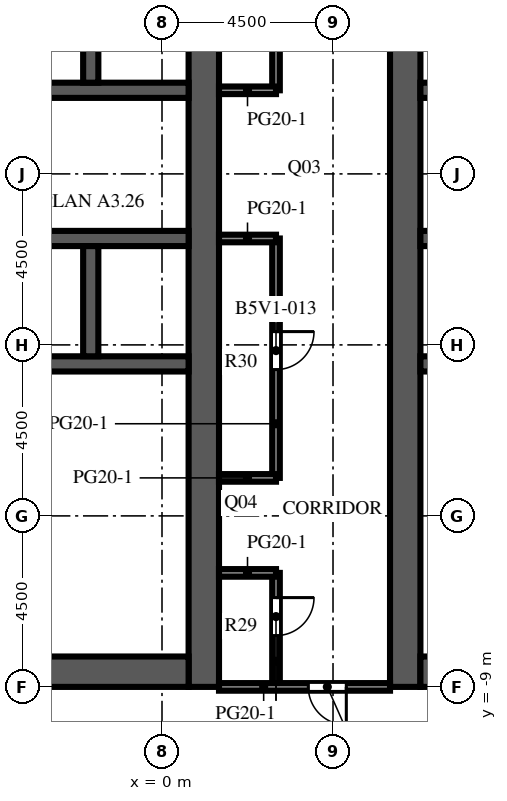
"""IFC4 building model, lengths in metres.
Left out: names, types, materials, properties, quantities, classifications, styles, units other than length and angle.
Written with IfcOpenShell. Run it as: python <this file> out.ifc"""

import sys

from ifc_helpers import new_model, si_unit, direction, frame, frame_2d, origin, place, context, subcontext, project, spatial, rectangle, extrude, element, fill, save


model = new_model("IFC4")
c1 = context("Model", 3, precision=1e-05, world=origin(), true_north=direction((0.0, 1.0)))
c2 = subcontext(c1, "Body", "Model", "MODEL_VIEW")
j1 = project(units=[si_unit("LENGTHUNIT", "METRE"), si_unit("PLANEANGLEUNIT", "RADIAN")], contexts=[c1])
p1 = place(None, origin())
s1 = spatial("IfcSite", under=j1, at=p1, CompositionType="ELEMENT")
p2 = place(p1, origin())
s2 = spatial("IfcBuilding", under=s1, at=p2, CompositionType="ELEMENT")
p3 = place(p2, frame((0.0, 0.0, 169.1)))
s3 = spatial("IfcBuildingStorey", under=s2, at=p3, CompositionType="ELEMENT", Elevation=169.1)
p4 = place(p3, frame((1.1, -9.0, 0.0), z_axis=(0.0, 0.0, 1.0), x_axis=(0.0, 1.0, 0.0)))
e1 = element("IfcWall", 1, at=p4, inside=s3, PredefinedType="SHEAR", context=c2, shape_type="SweptSolid", body=[
    extrude(rectangle(XDim=27.5, YDim=0.8, at=frame_2d((13.75, 0.0))), origin(), (0.0, 0.0, 1.0), 4.1),
])
p5 = place(p4, frame((12.55, 0.0, 0.0)))
e2 = element("IfcOpeningElement", 2, at=p5, cuts=e1, PredefinedType="OPENING", context=c2, shape_type="SweptSolid", body=[
    extrude(rectangle(XDim=2.4, YDim=2.4, at=frame_2d((1.2, 1.2))), frame((0.0, 0.41, 0.0), z_axis=(0.0, -1.0, 0.0), x_axis=(1.0, 0.0, 0.0)), (0.0, 0.0, 1.0), 0.82),
])
p6 = place(p4, frame((3.95, 0.0, 0.0)))
e3 = element("IfcOpeningElement", 3, at=p6, cuts=e1, PredefinedType="OPENING", context=c2, shape_type="SweptSolid", body=[
    extrude(rectangle(XDim=1.2, YDim=2.1, at=frame_2d((0.6, 1.05))), frame((0.0, 0.41, 0.0), z_axis=(0.0, -1.0, 0.0), x_axis=(1.0, 0.0, 0.0)), (0.0, 0.0, 1.0), 0.82),
])
p7 = place(p4, frame((22.35, 0.0, 0.0)))
e4 = element("IfcOpeningElement", 4, at=p7, cuts=e1, PredefinedType="OPENING", context=c2, shape_type="SweptSolid", body=[
    extrude(rectangle(XDim=1.2, YDim=2.1, at=frame_2d((0.6, 1.05))), frame((0.0, 0.41, 0.0), z_axis=(0.0, -1.0, 0.0), x_axis=(1.0, 0.0, 0.0)), (0.0, 0.0, 1.0), 0.82),
])
p8 = place(p3, frame((-9.7, -8.6, 0.0), z_axis=(0.0, 0.0, 1.0), x_axis=(1.0, 0.0, 0.0)))
e5 = element("IfcWall", 5, at=p8, inside=s3, PredefinedType="SHEAR", context=c2, shape_type="SweptSolid", body=[
    extrude(rectangle(XDim=10.4, YDim=0.8, at=frame_2d((5.2, 0.0))), origin(), (0.0, 0.0, 1.0), 4.1),
])
p9 = place(p3, frame((-9.7, -0.5, 0.0), z_axis=(0.0, 0.0, 1.0), x_axis=(1.0, 0.0, 0.0)))
e6 = element("IfcWall", 6, at=p9, inside=s3, PredefinedType="SHEAR", context=c2, shape_type="SweptSolid", body=[
    extrude(rectangle(XDim=10.4, YDim=0.4, at=frame_2d((5.2, 0.0))), origin(), (0.0, 0.0, 1.0), 4.1),
])
p10 = place(p3, frame((-9.7, 2.8, 0.0), z_axis=(0.0, 0.0, 1.0), x_axis=(1.0, 0.0, 0.0)))
e7 = element("IfcWall", 7, at=p10, inside=s3, PredefinedType="SHEAR", context=c2, shape_type="SweptSolid", body=[
    extrude(rectangle(XDim=10.4, YDim=0.4, at=frame_2d((5.2, 0.0))), origin(), (0.0, 0.0, 1.0), 4.1),
])
p11 = place(p10, frame((0.738, 0.0, 0.0)))
e8 = element("IfcOpeningElement", 8, at=p11, cuts=e7, PredefinedType="OPENING", context=c2, shape_type="SweptSolid", body=[
    extrude(rectangle(XDim=1.1, YDim=2.1, at=frame_2d((0.55, 1.05))), frame((0.0, 0.21, 0.0), z_axis=(0.0, -1.0, 0.0), x_axis=(1.0, 0.0, 0.0)), (0.0, 0.0, 1.0), 0.42),
])
p12 = place(p10, frame((3.337, 0.0, 0.0)))
e9 = element("IfcOpeningElement", 9, at=p12, cuts=e7, PredefinedType="OPENING", context=c2, shape_type="SweptSolid", body=[
    extrude(rectangle(XDim=1.1, YDim=2.1, at=frame_2d((0.55, 1.05))), frame((0.0, 0.21, 0.0), z_axis=(0.0, -1.0, 0.0), x_axis=(1.0, 0.0, 0.0)), (0.0, 0.0, 1.0), 0.42),
])
p13 = place(p10, frame((6.012, 0.0, 0.0)))
e10 = element("IfcOpeningElement", 10, at=p13, cuts=e7, PredefinedType="OPENING", context=c2, shape_type="SweptSolid", body=[
    extrude(rectangle(XDim=1.0, YDim=2.1, at=frame_2d((0.5, 1.05))), frame((0.0, 0.21, 0.0), z_axis=(0.0, -1.0, 0.0), x_axis=(1.0, 0.0, 0.0)), (0.0, 0.0, 1.0), 0.42),
])
p14 = place(p10, frame((8.613, 0.0, 0.0)))
e11 = element("IfcOpeningElement", 11, at=p14, cuts=e7, PredefinedType="OPENING", context=c2, shape_type="SweptSolid", body=[
    extrude(rectangle(XDim=1.0, YDim=2.1, at=frame_2d((0.5, 1.05))), frame((0.0, 0.21, 0.0), z_axis=(0.0, -1.0, 0.0), x_axis=(1.0, 0.0, 0.0)), (0.0, 0.0, 1.0), 0.42),
])
p15 = place(p3, frame((-9.7, 6.7, 0.0), z_axis=(0.0, 0.0, 1.0), x_axis=(1.0, 0.0, 0.0)))
e12 = element("IfcWall", 12, at=p15, inside=s3, PredefinedType="SHEAR", context=c2, shape_type="SweptSolid", body=[
    extrude(rectangle(XDim=10.4, YDim=0.4, at=frame_2d((5.2, 0.0))), origin(), (0.0, 0.0, 1.0), 4.1),
])
p16 = place(p15, frame((3.337, 0.0, 0.0)))
e13 = element("IfcOpeningElement", 13, at=p16, cuts=e12, PredefinedType="OPENING", context=c2, shape_type="SweptSolid", body=[
    extrude(rectangle(XDim=1.1, YDim=2.1, at=frame_2d((0.55, 1.05))), frame((0.0, 0.21, 0.0), z_axis=(0.0, -1.0, 0.0), x_axis=(1.0, 0.0, 0.0)), (0.0, 0.0, 1.0), 0.42),
])
p17 = place(p15, frame((5.962, 0.0, 0.0)))
e14 = element("IfcOpeningElement", 14, at=p17, cuts=e12, PredefinedType="OPENING", context=c2, shape_type="SweptSolid", body=[
    extrude(rectangle(XDim=1.1, YDim=2.1, at=frame_2d((0.55, 1.05))), frame((0.0, 0.21, 0.0), z_axis=(0.0, -1.0, 0.0), x_axis=(1.0, 0.0, 0.0)), (0.0, 0.0, 1.0), 0.42),
])
p18 = place(p15, frame((8.663, 0.0, 0.0)))
e15 = element("IfcOpeningElement", 15, at=p18, cuts=e12, PredefinedType="OPENING", context=c2, shape_type="SweptSolid", body=[
    extrude(rectangle(XDim=1.1, YDim=2.1, at=frame_2d((0.55, 1.05))), frame((0.0, 0.21, 0.0), z_axis=(0.0, -1.0, 0.0), x_axis=(1.0, 0.0, 0.0)), (0.0, 0.0, 1.0), 0.42),
])
p19 = place(p15, frame((0.688, 0.0, 0.0)))
e16 = element("IfcOpeningElement", 16, at=p19, cuts=e12, PredefinedType="OPENING", context=c2, shape_type="SweptSolid", body=[
    extrude(rectangle(XDim=1.0, YDim=2.1, at=frame_2d((0.5, 1.05))), frame((0.0, 0.21, 0.0), z_axis=(0.0, -1.0, 0.0), x_axis=(1.0, 0.0, 0.0)), (0.0, 0.0, 1.0), 0.42),
])
for number, where, z_axis, x_axis in (
    (17, (-1.875, -0.3, 0.0), (0.0, 0.0, 1.0), (0.0, 1.0, 0.0)),
    (18, (-1.875, 6.9, 0.0), (0.0, 0.0, 1.0), (0.0, 1.0, 0.0)),
):
    element("IfcWall", number, at=place(p3, frame(where, z_axis=z_axis, x_axis=x_axis)), inside=s3, PredefinedType="SHEAR", context=c2, shape_type="SweptSolid", body=[
        extrude(rectangle(XDim=2.9, YDim=0.4, at=frame_2d((1.45, 0.0))), origin(), (0.0, 0.0, 1.0), 4.1),
    ])
p20 = place(p3, frame((6.4, -9.0, 0.0), z_axis=(0.0, 0.0, 1.0), x_axis=(0.0, 1.0, 0.0)))
e19 = element("IfcWall", 19, at=p20, inside=s3, PredefinedType="SHEAR", context=c2, shape_type="SweptSolid", body=[
    extrude(rectangle(XDim=27.5, YDim=0.8, at=frame_2d((13.75, 0.0))), origin(), (0.0, 0.0, 1.0), 4.1),
])
p21 = place(p20, frame((12.55, 0.0, 0.0)))
e20 = element("IfcOpeningElement", 20, at=p21, cuts=e19, PredefinedType="OPENING", context=c2, shape_type="SweptSolid", body=[
    extrude(rectangle(XDim=2.4, YDim=2.4, at=frame_2d((1.2, 1.2))), frame((0.0, 0.41, 0.0), z_axis=(0.0, -1.0, 0.0), x_axis=(1.0, 0.0, 0.0)), (0.0, 0.0, 1.0), 0.82),
])
p22 = place(p20, frame((3.95, 0.0, 0.0)))
e21 = element("IfcOpeningElement", 21, at=p22, cuts=e19, PredefinedType="OPENING", context=c2, shape_type="SweptSolid", body=[
    extrude(rectangle(XDim=1.2, YDim=2.1, at=frame_2d((0.6, 1.05))), frame((0.0, 0.41, 0.0), z_axis=(0.0, -1.0, 0.0), x_axis=(1.0, 0.0, 0.0)), (0.0, 0.0, 1.0), 0.82),
])
p23 = place(p20, frame((22.35, 0.0, 0.0)))
e22 = element("IfcOpeningElement", 22, at=p23, cuts=e19, PredefinedType="OPENING", context=c2, shape_type="SweptSolid", body=[
    extrude(rectangle(XDim=1.2, YDim=2.1, at=frame_2d((0.6, 1.05))), frame((0.0, 0.41, 0.0), z_axis=(0.0, -1.0, 0.0), x_axis=(1.0, 0.0, 0.0)), (0.0, 0.0, 1.0), 0.82),
])
p24 = place(p3, frame((6.8, -8.6, 0.0), z_axis=(0.0, 0.0, 1.0), x_axis=(1.0, 0.0, 0.0)))
e23 = element("IfcWall", 23, at=p24, inside=s3, PredefinedType="SHEAR", context=c2, shape_type="SweptSolid", body=[
    extrude(rectangle(XDim=10.4, YDim=0.8, at=frame_2d((5.2, 0.0))), origin(), (0.0, 0.0, 1.0), 4.1),
])
p25 = place(p3, frame((6.8, -0.5, 0.0), z_axis=(0.0, 0.0, 1.0), x_axis=(1.0, 0.0, 0.0)))
e24 = element("IfcWall", 24, at=p25, inside=s3, PredefinedType="SHEAR", context=c2, shape_type="SweptSolid", body=[
    extrude(rectangle(XDim=10.4, YDim=0.4, at=frame_2d((5.2, 0.0))), origin(), (0.0, 0.0, 1.0), 4.1),
])
p26 = place(p3, frame((6.8, 2.8, 0.0), z_axis=(0.0, 0.0, 1.0), x_axis=(1.0, 0.0, 0.0)))
e25 = element("IfcWall", 25, at=p26, inside=s3, PredefinedType="SHEAR", context=c2, shape_type="SweptSolid", body=[
    extrude(rectangle(XDim=10.4, YDim=0.4, at=frame_2d((5.2, 0.0))), origin(), (0.0, 0.0, 1.0), 4.1),
])
p27 = place(p26, frame((0.738, 0.0, 0.0)))
e26 = element("IfcOpeningElement", 26, at=p27, cuts=e25, PredefinedType="OPENING", context=c2, shape_type="SweptSolid", body=[
    extrude(rectangle(XDim=1.1, YDim=2.1, at=frame_2d((0.55, 1.05))), frame((0.0, 0.21, 0.0), z_axis=(0.0, -1.0, 0.0), x_axis=(1.0, 0.0, 0.0)), (0.0, 0.0, 1.0), 0.42),
])
p28 = place(p26, frame((3.337, 0.0, 0.0)))
e27 = element("IfcOpeningElement", 27, at=p28, cuts=e25, PredefinedType="OPENING", context=c2, shape_type="SweptSolid", body=[
    extrude(rectangle(XDim=1.1, YDim=2.1, at=frame_2d((0.55, 1.05))), frame((0.0, 0.21, 0.0), z_axis=(0.0, -1.0, 0.0), x_axis=(1.0, 0.0, 0.0)), (0.0, 0.0, 1.0), 0.42),
])
p29 = place(p26, frame((6.012, 0.0, 0.0)))
e28 = element("IfcOpeningElement", 28, at=p29, cuts=e25, PredefinedType="OPENING", context=c2, shape_type="SweptSolid", body=[
    extrude(rectangle(XDim=1.0, YDim=2.1, at=frame_2d((0.5, 1.05))), frame((0.0, 0.21, 0.0), z_axis=(0.0, -1.0, 0.0), x_axis=(1.0, 0.0, 0.0)), (0.0, 0.0, 1.0), 0.42),
])
p30 = place(p26, frame((8.613, 0.0, 0.0)))
e29 = element("IfcOpeningElement", 29, at=p30, cuts=e25, PredefinedType="OPENING", context=c2, shape_type="SweptSolid", body=[
    extrude(rectangle(XDim=1.0, YDim=2.1, at=frame_2d((0.5, 1.05))), frame((0.0, 0.21, 0.0), z_axis=(0.0, -1.0, 0.0), x_axis=(1.0, 0.0, 0.0)), (0.0, 0.0, 1.0), 0.42),
])
p31 = place(p3, frame((6.8, 6.7, 0.0), z_axis=(0.0, 0.0, 1.0), x_axis=(1.0, 0.0, 0.0)))
e30 = element("IfcWall", 30, at=p31, inside=s3, PredefinedType="SHEAR", context=c2, shape_type="SweptSolid", body=[
    extrude(rectangle(XDim=10.4, YDim=0.4, at=frame_2d((5.2, 0.0))), origin(), (0.0, 0.0, 1.0), 4.1),
])
p32 = place(p31, frame((3.337, 0.0, 0.0)))
e31 = element("IfcOpeningElement", 31, at=p32, cuts=e30, PredefinedType="OPENING", context=c2, shape_type="SweptSolid", body=[
    extrude(rectangle(XDim=1.1, YDim=2.1, at=frame_2d((0.55, 1.05))), frame((0.0, 0.21, 0.0), z_axis=(0.0, -1.0, 0.0), x_axis=(1.0, 0.0, 0.0)), (0.0, 0.0, 1.0), 0.42),
])
p33 = place(p31, frame((5.962, 0.0, 0.0)))
e32 = element("IfcOpeningElement", 32, at=p33, cuts=e30, PredefinedType="OPENING", context=c2, shape_type="SweptSolid", body=[
    extrude(rectangle(XDim=1.1, YDim=2.1, at=frame_2d((0.55, 1.05))), frame((0.0, 0.21, 0.0), z_axis=(0.0, -1.0, 0.0), x_axis=(1.0, 0.0, 0.0)), (0.0, 0.0, 1.0), 0.42),
])
p34 = place(p31, frame((8.663, 0.0, 0.0)))
e33 = element("IfcOpeningElement", 33, at=p34, cuts=e30, PredefinedType="OPENING", context=c2, shape_type="SweptSolid", body=[
    extrude(rectangle(XDim=1.1, YDim=2.1, at=frame_2d((0.55, 1.05))), frame((0.0, 0.21, 0.0), z_axis=(0.0, -1.0, 0.0), x_axis=(1.0, 0.0, 0.0)), (0.0, 0.0, 1.0), 0.42),
])
p35 = place(p31, frame((0.688, 0.0, 0.0)))
e34 = element("IfcOpeningElement", 34, at=p35, cuts=e30, PredefinedType="OPENING", context=c2, shape_type="SweptSolid", body=[
    extrude(rectangle(XDim=1.0, YDim=2.1, at=frame_2d((0.5, 1.05))), frame((0.0, 0.21, 0.0), z_axis=(0.0, -1.0, 0.0), x_axis=(1.0, 0.0, 0.0)), (0.0, 0.0, 1.0), 0.42),
])
p36 = place(p3, frame((-0.8, -8.2, 0.0), z_axis=(0.0, 0.0, 1.0), x_axis=(0.0, 1.0, 0.0)))
e35 = element("IfcWall", 35, at=p36, inside=s3, PredefinedType="PARTITIONING", context=c2, shape_type="SweptSolid", body=[
    extrude(rectangle(XDim=2.55, YDim=0.1, at=frame_2d((1.275, 0.0))), origin(), (0.0, 0.0, 1.0), 3.65),
])
p37 = place(p36, frame((0.775, 0.0, 0.0)))
e36 = element("IfcOpeningElement", 36, at=p37, cuts=e35, PredefinedType="OPENING", context=c2, shape_type="SweptSolid", body=[
    extrude(rectangle(XDim=1.0, YDim=2.1, at=frame_2d((0.5, 1.05))), frame((0.0, 0.06, 0.0), z_axis=(0.0, -1.0, 0.0), x_axis=(1.0, 0.0, 0.0)), (0.0, 0.0, 1.0), 0.12),
])
p38 = place(p3, frame((-0.8, -5.65, 0.0), z_axis=(0.0, 0.0, 1.0), x_axis=(0.0, 1.0, 0.0)))
e37 = element("IfcWall", 37, at=p38, inside=s3, PredefinedType="PARTITIONING", context=c2, shape_type="SweptSolid", body=[
    extrude(rectangle(XDim=2.1, YDim=0.1, at=frame_2d((1.05, 0.0))), origin(), (0.0, 0.0, 1.0), 3.65),
])
p39 = place(p38, frame((0.55, 0.0, 0.0)))
e38 = element("IfcOpeningElement", 38, at=p39, cuts=e37, PredefinedType="OPENING", context=c2, shape_type="SweptSolid", body=[
    extrude(rectangle(XDim=1.0, YDim=2.1, at=frame_2d((0.5, 1.05))), frame((0.0, 0.06, 0.0), z_axis=(0.0, -1.0, 0.0), x_axis=(1.0, 0.0, 0.0)), (0.0, 0.0, 1.0), 0.12),
])
p40 = place(p3, frame((-0.8, -3.55, 0.0), z_axis=(0.0, 0.0, 1.0), x_axis=(0.0, 1.0, 0.0)))
e39 = element("IfcWall", 39, at=p40, inside=s3, PredefinedType="PARTITIONING", context=c2, shape_type="SweptSolid", body=[
    extrude(rectangle(XDim=2.85, YDim=0.1, at=frame_2d((1.425, 0.0))), origin(), (0.0, 0.0, 1.0), 3.65),
])
p41 = place(p40, frame((0.925, 0.0, 0.0)))
e40 = element("IfcOpeningElement", 40, at=p41, cuts=e39, PredefinedType="OPENING", context=c2, shape_type="SweptSolid", body=[
    extrude(rectangle(XDim=1.0, YDim=2.1, at=frame_2d((0.5, 1.05))), frame((0.0, 0.06, 0.0), z_axis=(0.0, -1.0, 0.0), x_axis=(1.0, 0.0, 0.0)), (0.0, 0.0, 1.0), 0.12),
])
for number, where, z_axis, x_axis in (
    (41, (-4.3, -5.65, 0.0), (0.0, 0.0, 1.0), (1.0, 0.0, 0.0)),
    (42, (-4.3, -3.55, 0.0), (0.0, 0.0, 1.0), (1.0, 0.0, 0.0)),
):
    element("IfcWall", number, at=place(p3, frame(where, z_axis=z_axis, x_axis=x_axis)), inside=s3, PredefinedType="PARTITIONING", context=c2, shape_type="SweptSolid", body=[
        extrude(rectangle(XDim=3.5, YDim=0.1, at=frame_2d((1.75, 0.0))), origin(), (0.0, 0.0, 1.0), 3.65),
    ])
p42 = place(p3, frame((3.0, -9.0, 0.0), z_axis=(0.0, 0.0, 1.0), x_axis=(0.0, 1.0, 0.0)))
e43 = element("IfcWall", 43, at=p42, inside=s3, PredefinedType="PARTITIONING", context=c2, shape_type="SweptSolid", body=[
    extrude(rectangle(XDim=3.0, YDim=0.2, at=frame_2d((1.5, 0.0))), origin(), (0.0, 0.0, 1.0), 3.65),
])
p43 = place(p42, frame((1.35, 0.0, 0.0)))
e44 = element("IfcOpeningElement", 44, at=p43, cuts=e43, PredefinedType="OPENING", context=c2, shape_type="SweptSolid", body=[
    extrude(rectangle(XDim=1.0, YDim=2.1, at=frame_2d((0.5, 1.05))), frame((0.0, 0.11, 0.0), z_axis=(0.0, -1.0, 0.0), x_axis=(1.0, 0.0, 0.0)), (0.0, 0.0, 1.0), 0.22),
])
p44 = place(p3, frame((3.0, -3.5, 0.0), z_axis=(0.0, 0.0, 1.0), x_axis=(0.0, 1.0, 0.0)))
e45 = element("IfcWall", 45, at=p44, inside=s3, PredefinedType="PARTITIONING", context=c2, shape_type="SweptSolid", body=[
    extrude(rectangle(XDim=6.3, YDim=0.2, at=frame_2d((3.15, 0.0))), origin(), (0.0, 0.0, 1.0), 3.65),
])
p45 = place(p44, frame((2.85, 0.0, 0.0)))
e46 = element("IfcOpeningElement", 46, at=p45, cuts=e45, PredefinedType="OPENING", context=c2, shape_type="SweptSolid", body=[
    extrude(rectangle(XDim=1.0, YDim=2.1, at=frame_2d((0.5, 1.05))), frame((0.0, 0.11, 0.0), z_axis=(0.0, -1.0, 0.0), x_axis=(1.0, 0.0, 0.0)), (0.0, 0.0, 1.0), 0.22),
])
p46 = place(p3, frame((3.0, 6.7, 0.0), z_axis=(0.0, 0.0, 1.0), x_axis=(0.0, 1.0, 0.0)))
e47 = element("IfcWall", 47, at=p46, inside=s3, PredefinedType="PARTITIONING", context=c2, shape_type="SweptSolid", body=[
    extrude(rectangle(XDim=11.8, YDim=0.2, at=frame_2d((5.9, 0.0))), origin(), (0.0, 0.0, 1.0), 3.65),
])
p47 = place(p46, frame((5.35, 0.0, 0.0)))
e48 = element("IfcOpeningElement", 48, at=p47, cuts=e47, PredefinedType="OPENING", context=c2, shape_type="SweptSolid", body=[
    extrude(rectangle(XDim=1.0, YDim=2.1, at=frame_2d((0.5, 1.05))), frame((0.0, 0.11, 0.0), z_axis=(0.0, -1.0, 0.0), x_axis=(1.0, 0.0, 0.0)), (0.0, 0.0, 1.0), 0.22),
])
p48 = place(p3, frame((6.0, -9.0, 0.0), z_axis=(0.0, 0.0, 1.0), x_axis=(-1.0, 0.0, 0.0)))
e49 = element("IfcWall", 49, at=p48, inside=s3, PredefinedType="PARTITIONING", context=c2, shape_type="SweptSolid", body=[
    extrude(rectangle(XDim=4.5, YDim=0.2, at=frame_2d((2.25, 0.0))), origin(), (0.0, 0.0, 1.0), 3.65),
])
p49 = place(p48, frame((1.15, 0.0, 0.0)))
e50 = element("IfcOpeningElement", 50, at=p49, cuts=e49, PredefinedType="OPENING", context=c2, shape_type="SweptSolid", body=[
    extrude(rectangle(XDim=1.0, YDim=2.1, at=frame_2d((0.5, 1.05))), frame((0.0, 0.11, 0.0), z_axis=(0.0, -1.0, 0.0), x_axis=(1.0, 0.0, 0.0)), (0.0, 0.0, 1.0), 0.22),
])
for number, where, z_axis, x_axis in (
    (51, (1.5, -6.0, 0.0), (0.0, 0.0, 1.0), (1.0, 0.0, 0.0)),
    (52, (1.5, -3.5, 0.0), (0.0, 0.0, 1.0), (1.0, 0.0, 0.0)),
    (53, (1.5, 2.8, 0.0), (0.0, 0.0, 1.0), (1.0, 0.0, 0.0)),
    (54, (1.5, 6.7, 0.0), (0.0, 0.0, 1.0), (1.0, 0.0, 0.0)),
):
    element("IfcWall", number, at=place(p3, frame(where, z_axis=z_axis, x_axis=x_axis)), inside=s3, PredefinedType="PARTITIONING", context=c2, shape_type="SweptSolid", body=[
        extrude(rectangle(XDim=1.5, YDim=0.2, at=frame_2d((0.75, 0.0))), origin(), (0.0, 0.0, 1.0), 3.65),
    ])
p50 = place(p17, origin())
e55 = element("IfcDoor", 55, at=p50, inside=s3, OperationType="DOUBLE_DOOR_SLIDING", PredefinedType="DOOR", context=c2, shape_type="SweptSolid", body=[
    extrude(rectangle(XDim=1.1, YDim=2.1, at=frame_2d((0.55, 1.05))), frame((0.0, 0.025, 0.0), z_axis=(0.0, -1.0, 0.0), x_axis=(1.0, 0.0, 0.0)), (0.0, 0.0, 1.0), 0.05),
])
fill(e14, e55)
p51 = place(p18, origin())
e56 = element("IfcDoor", 56, at=p51, inside=s3, OperationType="DOUBLE_DOOR_SLIDING", PredefinedType="DOOR", context=c2, shape_type="SweptSolid", body=[
    extrude(rectangle(XDim=1.1, YDim=2.1, at=frame_2d((0.55, 1.05))), frame((0.0, 0.025, 0.0), z_axis=(0.0, -1.0, 0.0), x_axis=(1.0, 0.0, 0.0)), (0.0, 0.0, 1.0), 0.05),
])
fill(e15, e56)
p52 = place(p5, origin())
e57 = element("IfcDoor", 57, at=p52, inside=s3, OperationType="DOUBLE_DOOR_DOUBLE_SWING", PredefinedType="DOOR", context=c2, shape_type="SweptSolid", body=[
    extrude(rectangle(XDim=2.4, YDim=2.4, at=frame_2d((1.2, 1.2))), frame((0.0, 0.025, 0.0), z_axis=(0.0, -1.0, 0.0), x_axis=(1.0, 0.0, 0.0)), (0.0, 0.0, 1.0), 0.05),
])
fill(e2, e57)
p53 = place(p21, origin())
e58 = element("IfcDoor", 58, at=p53, inside=s3, OperationType="DOUBLE_DOOR_DOUBLE_SWING", PredefinedType="DOOR", context=c2, shape_type="SweptSolid", body=[
    extrude(rectangle(XDim=2.4, YDim=2.4, at=frame_2d((1.2, 1.2))), frame((0.0, 0.025, 0.0), z_axis=(0.0, -1.0, 0.0), x_axis=(1.0, 0.0, 0.0)), (0.0, 0.0, 1.0), 0.05),
])
fill(e20, e58)
p54 = place(p13, origin())
e59 = element("IfcDoor", 59, at=p54, inside=s3, OperationType="SINGLE_SWING_LEFT", PredefinedType="DOOR", context=c2, shape_type="SweptSolid", body=[
    extrude(rectangle(XDim=1.0, YDim=2.1, at=frame_2d((0.5, 1.05))), frame((0.0, 0.025, 0.0), z_axis=(0.0, -1.0, 0.0), x_axis=(1.0, 0.0, 0.0)), (0.0, 0.0, 1.0), 0.05),
])
fill(e10, e59)
p55 = place(p14, origin())
e60 = element("IfcDoor", 60, at=p55, inside=s3, OperationType="SINGLE_SWING_RIGHT", PredefinedType="DOOR", context=c2, shape_type="SweptSolid", body=[
    extrude(rectangle(XDim=1.0, YDim=2.1, at=frame_2d((0.5, 1.05))), frame((0.0, 0.025, 0.0), z_axis=(0.0, -1.0, 0.0), x_axis=(1.0, 0.0, 0.0)), (0.0, 0.0, 1.0), 0.05),
])
fill(e11, e60)
p56 = place(p6, origin())
e61 = element("IfcDoor", 61, at=p56, inside=s3, OperationType="SINGLE_SWING_LEFT", PredefinedType="DOOR", context=c2, shape_type="SweptSolid", body=[
    extrude(rectangle(XDim=1.2, YDim=2.1, at=frame_2d((0.6, 1.05))), frame((0.0, 0.375, 0.0), z_axis=(0.0, -1.0, 0.0), x_axis=(1.0, 0.0, 0.0)), (0.0, 0.0, 1.0), 0.05),
])
fill(e3, e61)
p57 = place(p37, origin())
e62 = element("IfcDoor", 62, at=p57, inside=s3, OperationType="SINGLE_SWING_RIGHT", PredefinedType="DOOR", context=c2, shape_type="SweptSolid", body=[
    extrude(rectangle(XDim=1.0, YDim=2.1, at=frame_2d((0.5, 1.05))), frame((0.0, 0.025, 0.0), z_axis=(0.0, -1.0, 0.0), x_axis=(1.0, 0.0, 0.0)), (0.0, 0.0, 1.0), 0.05),
])
fill(e36, e62)
p58 = place(p39, origin())
e63 = element("IfcDoor", 63, at=p58, inside=s3, OperationType="SINGLE_SWING_LEFT", PredefinedType="DOOR", context=c2, shape_type="SweptSolid", body=[
    extrude(rectangle(XDim=1.0, YDim=2.1, at=frame_2d((0.5, 1.05))), frame((0.0, 0.025, 0.0), z_axis=(0.0, -1.0, 0.0), x_axis=(1.0, 0.0, 0.0)), (0.0, 0.0, 1.0), 0.05),
])
fill(e38, e63)
p59 = place(p41, origin())
e64 = element("IfcDoor", 64, at=p59, inside=s3, OperationType="SINGLE_SWING_RIGHT", PredefinedType="DOOR", context=c2, shape_type="SweptSolid", body=[
    extrude(rectangle(XDim=1.0, YDim=2.1, at=frame_2d((0.5, 1.05))), frame((0.0, 0.025, 0.0), z_axis=(0.0, -1.0, 0.0), x_axis=(1.0, 0.0, 0.0)), (0.0, 0.0, 1.0), 0.05),
])
fill(e40, e64)
p60 = place(p22, origin())
e65 = element("IfcDoor", 65, at=p60, inside=s3, OperationType="SINGLE_SWING_RIGHT", PredefinedType="DOOR", context=c2, shape_type="SweptSolid", body=[
    extrude(rectangle(XDim=1.2, YDim=2.1, at=frame_2d((0.6, 1.05))), frame((0.0, -0.325, 0.0), z_axis=(0.0, -1.0, 0.0), x_axis=(1.0, 0.0, 0.0)), (0.0, 0.0, 1.0), 0.05),
])
fill(e21, e65)
p61 = place(p49, origin())
e66 = element("IfcDoor", 66, at=p61, inside=s3, OperationType="SINGLE_SWING_LEFT", PredefinedType="DOOR", context=c2, shape_type="SweptSolid", body=[
    extrude(rectangle(XDim=1.0, YDim=2.1, at=frame_2d((0.5, 1.05))), frame((0.0, 0.025, 0.0), z_axis=(0.0, -1.0, 0.0), x_axis=(1.0, 0.0, 0.0)), (0.0, 0.0, 1.0), 0.05),
])
fill(e50, e66)
p62 = place(p43, origin())
e67 = element("IfcDoor", 67, at=p62, inside=s3, OperationType="SINGLE_SWING_RIGHT", PredefinedType="DOOR", context=c2, shape_type="SweptSolid", body=[
    extrude(rectangle(XDim=1.0, YDim=2.1, at=frame_2d((0.5, 1.05))), frame((0.0, 0.025, 0.0), z_axis=(0.0, -1.0, 0.0), x_axis=(1.0, 0.0, 0.0)), (0.0, 0.0, 1.0), 0.05),
])
fill(e44, e67)
p63 = place(p45, origin())
e68 = element("IfcDoor", 68, at=p63, inside=s3, OperationType="SINGLE_SWING_RIGHT", PredefinedType="DOOR", context=c2, shape_type="SweptSolid", body=[
    extrude(rectangle(XDim=1.0, YDim=2.1, at=frame_2d((0.5, 1.05))), frame((0.0, 0.025, 0.0), z_axis=(0.0, -1.0, 0.0), x_axis=(1.0, 0.0, 0.0)), (0.0, 0.0, 1.0), 0.05),
])
fill(e46, e68)
save(model, sys.argv[1])
